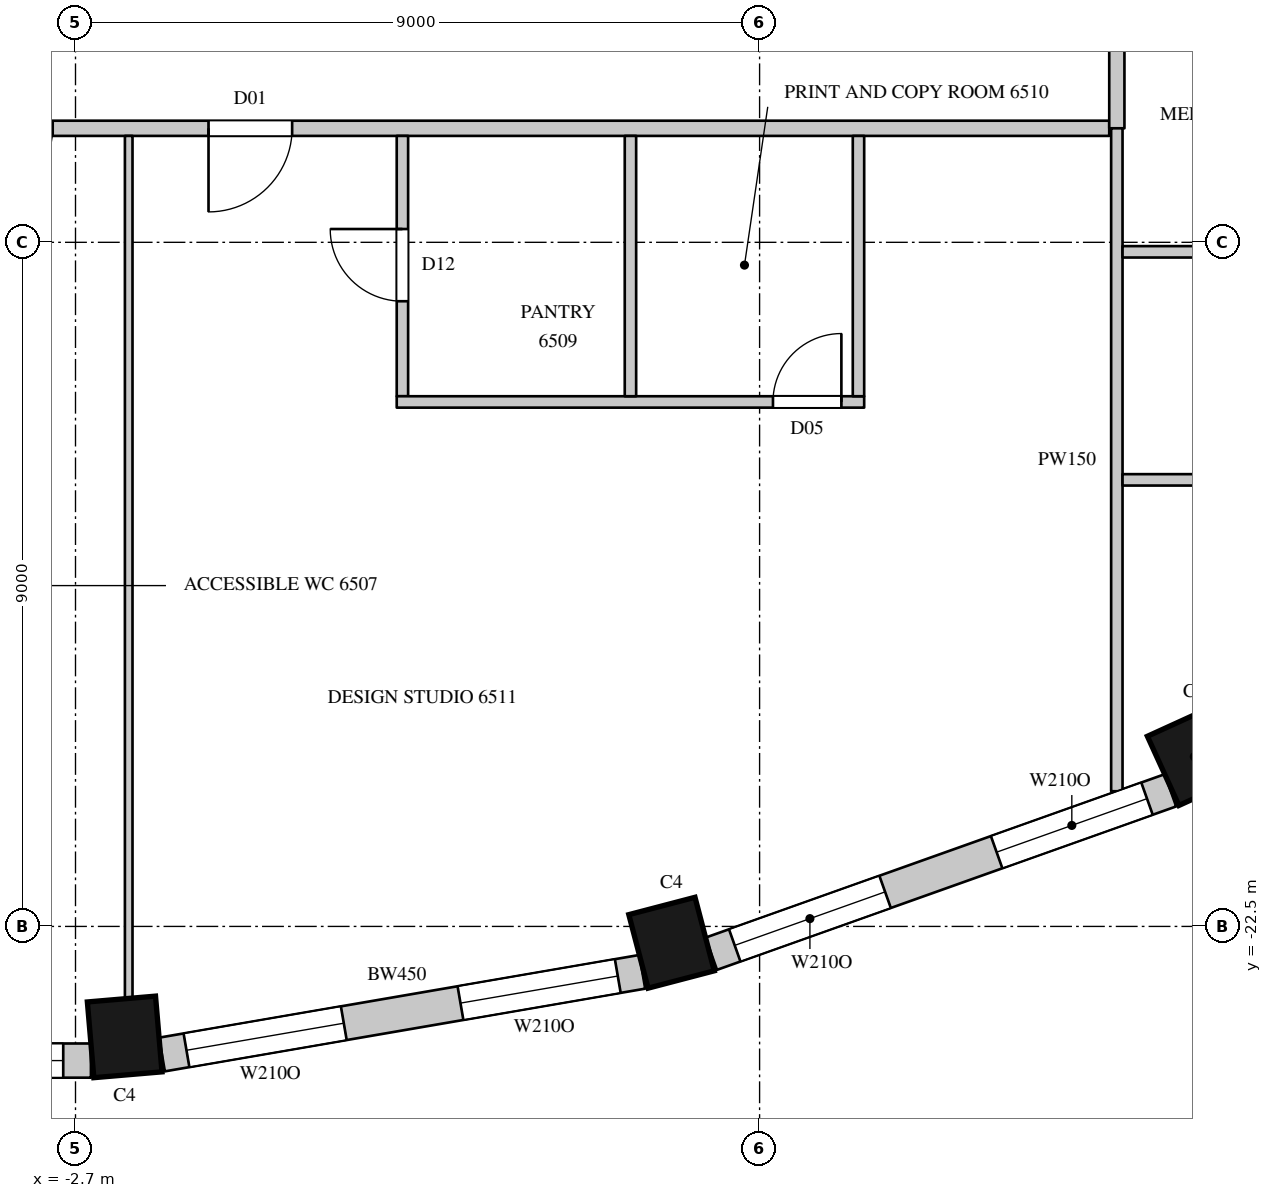
"""IFC4 building model, lengths in metres.
Left out: names, types, materials, properties, quantities, classifications, styles, units other than length and angle.
Written with IfcOpenShell. Run it as: python <this file> out.ifc"""

import sys

from ifc_helpers import new_model, si_unit, direction, frame, frame_2d, origin, origin_2d, place, context, subcontext, project, spatial, rectangle, extrude, element, fill, save


model = new_model("IFC4")
c1 = context("Model", 3, precision=1e-05, world=origin(), true_north=direction((0.0, 1.0)))
c2 = subcontext(c1, "Body", "Model", "MODEL_VIEW")
j1 = project(units=[si_unit("LENGTHUNIT", "METRE"), si_unit("PLANEANGLEUNIT", "RADIAN")], contexts=[c1])
p1 = place(None, origin())
s1 = spatial("IfcSite", under=j1, at=p1, CompositionType="ELEMENT")
p2 = place(p1, origin())
s2 = spatial("IfcBuilding", under=s1, at=p2, CompositionType="ELEMENT")
p3 = place(p2, frame((0.0, 0.0, 288.5)))
s3 = spatial("IfcBuildingStorey", under=s2, at=p3, CompositionType="ELEMENT", Elevation=288.5)
for number, where, z_axis, x_axis in (
    (1, (-2.053, -23.954, 0.0), (0.0, 0.0, 1.0), (0.996, 0.085, 0.0)),
    (2, (5.142, -22.715, 0.0), (0.0, 0.0, 1.0), (0.967, 0.253, 0.0)),
    (3, (12.019, -20.267, 0.0), (0.0, 0.0, 1.0), (0.91, 0.415, 0.0)),
):
    element("IfcColumn", number, at=place(p3, frame(where, z_axis=z_axis, x_axis=x_axis)), inside=s3, PredefinedType="COLUMN", context=c2, shape_type="SweptSolid", body=[
        extrude(rectangle(XDim=0.9, YDim=1.0, at=origin_2d()), origin(), (0.0, 0.0, 1.0), 4.1),
    ])
p4 = place(p3, frame((-8.903, -24.265, 0.0), z_axis=(0.0, 0.0, 1.0), x_axis=(1.0, 0.0, 0.0)))
e4 = element("IfcWall", 4, at=p4, inside=s3, PredefinedType="SOLIDWALL", context=c2, shape_type="SweptSolid", body=[
    extrude(rectangle(XDim=6.406, YDim=0.45, at=frame_2d((3.203, 0.0))), origin(), (0.0, 0.0, 1.0), 3.8),
])
p5 = place(p4, frame((1.514, 0.0, 1.05)))
e5 = element("IfcOpeningElement", 5, at=p5, cuts=e4, PredefinedType="OPENING", context=c2, shape_type="SweptSolid", body=[
    extrude(rectangle(XDim=0.9, YDim=2.4, at=frame_2d((0.45, 1.2))), frame((0.0, 0.235, 0.0), z_axis=(0.0, -1.0, 0.0), x_axis=(1.0, 0.0, 0.0)), (0.0, 0.0, 1.0), 0.47),
])
p6 = place(p4, frame((4.841, 0.0, 1.05)))
e6 = element("IfcOpeningElement", 6, at=p6, cuts=e4, PredefinedType="OPENING", context=c2, shape_type="SweptSolid", body=[
    extrude(rectangle(XDim=1.2, YDim=2.4, at=frame_2d((0.6, 1.2))), frame((0.0, 0.235, 0.0), z_axis=(0.0, -1.0, 0.0), x_axis=(1.0, 0.0, 0.0)), (0.0, 0.0, 1.0), 0.47),
])
p7 = place(p3, frame((-1.562, -24.185, 0.0), z_axis=(0.0, 0.0, 1.0), x_axis=(0.985502073964, 0.169663379113, 0.0)))
e7 = element("IfcWall", 7, at=p7, inside=s3, PredefinedType="SOLIDWALL", context=c2, shape_type="SweptSolid", body=[
    extrude(rectangle(XDim=6.412, YDim=0.45, at=frame_2d((3.206, 0.0))), origin(), (0.0, 0.0, 1.0), 3.8),
])
p8 = place(p7, frame((0.327, 0.0, 1.05)))
e8 = element("IfcOpeningElement", 8, at=p8, cuts=e7, PredefinedType="OPENING", context=c2, shape_type="SweptSolid", body=[
    extrude(rectangle(XDim=2.1, YDim=2.4, at=frame_2d((1.05, 1.2))), frame((0.0, 0.235, 0.0), z_axis=(0.0, -1.0, 0.0), x_axis=(1.0, 0.0, 0.0)), (0.0, 0.0, 1.0), 0.47),
])
p9 = place(p7, frame((3.985, 0.0, 1.05)))
e9 = element("IfcOpeningElement", 9, at=p9, cuts=e7, PredefinedType="OPENING", context=c2, shape_type="SweptSolid", body=[
    extrude(rectangle(XDim=2.1, YDim=2.4, at=frame_2d((1.05, 1.2))), frame((0.0, 0.235, 0.0), z_axis=(0.0, -1.0, 0.0), x_axis=(1.0, 0.0, 0.0)), (0.0, 0.0, 1.0), 0.47),
])
p10 = place(p3, frame((5.665, -22.859, 0.0), z_axis=(0.0, 0.0, 1.0), x_axis=(0.942108340262, 0.335308626803, 0.0)))
e10 = element("IfcWall", 10, at=p10, inside=s3, PredefinedType="SOLIDWALL", context=c2, shape_type="SweptSolid", body=[
    extrude(rectangle(XDim=6.412, YDim=0.45, at=frame_2d((3.206, 0.0))), origin(), (0.0, 0.0, 1.0), 3.8),
])
p11 = place(p10, frame((0.327, 0.0, 1.05)))
e11 = element("IfcOpeningElement", 11, at=p11, cuts=e10, PredefinedType="OPENING", context=c2, shape_type="SweptSolid", body=[
    extrude(rectangle(XDim=2.1, YDim=2.4, at=frame_2d((1.05, 1.2))), frame((0.0, 0.235, 0.0), z_axis=(0.0, -1.0, 0.0), x_axis=(1.0, 0.0, 0.0)), (0.0, 0.0, 1.0), 0.47),
])
p12 = place(p10, frame((3.985, 0.0, 1.05)))
e12 = element("IfcOpeningElement", 12, at=p12, cuts=e10, PredefinedType="OPENING", context=c2, shape_type="SweptSolid", body=[
    extrude(rectangle(XDim=2.1, YDim=2.4, at=frame_2d((1.05, 1.2))), frame((0.0, 0.235, 0.0), z_axis=(0.0, -1.0, 0.0), x_axis=(1.0, 0.0, 0.0)), (0.0, 0.0, 1.0), 0.47),
])
p13 = place(p3, frame((-10.9, -12.0, 0.0), z_axis=(0.0, 0.0, 1.0), x_axis=(1.0, 0.0, 0.0)))
e13 = element("IfcWall", 13, at=p13, inside=s3, PredefinedType="PARTITIONING", context=c2, shape_type="SweptSolid", body=[
    extrude(rectangle(XDim=21.8, YDim=0.2, at=frame_2d((10.9, 0.0))), origin(), (0.0, 0.0, 1.0), 3.8),
])
p14 = place(p13, frame((1.1, 0.0, 0.0)))
e14 = element("IfcOpeningElement", 14, at=p14, cuts=e13, PredefinedType="OPENING", context=c2, shape_type="SweptSolid", body=[
    extrude(rectangle(XDim=0.9, YDim=2.2, at=frame_2d((0.45, 1.1))), frame((0.0, 0.11, 0.0), z_axis=(0.0, -1.0, 0.0), x_axis=(1.0, 0.0, 0.0)), (0.0, 0.0, 1.0), 0.22),
])
p15 = place(p13, frame((4.9, 0.0, 0.0)))
e15 = element("IfcOpeningElement", 15, at=p15, cuts=e13, PredefinedType="OPENING", context=c2, shape_type="SweptSolid", body=[
    extrude(rectangle(XDim=0.9, YDim=2.2, at=frame_2d((0.45, 1.1))), frame((0.0, 0.11, 0.0), z_axis=(0.0, -1.0, 0.0), x_axis=(1.0, 0.0, 0.0)), (0.0, 0.0, 1.0), 0.22),
])
p16 = place(p13, frame((7.0, 0.0, 0.0)))
e16 = element("IfcOpeningElement", 16, at=p16, cuts=e13, PredefinedType="OPENING", context=c2, shape_type="SweptSolid", body=[
    extrude(rectangle(XDim=0.9, YDim=2.2, at=frame_2d((0.45, 1.1))), frame((0.0, 0.11, 0.0), z_axis=(0.0, -1.0, 0.0), x_axis=(1.0, 0.0, 0.0)), (0.0, 0.0, 1.0), 0.22),
])
p17 = place(p13, frame((9.95, 0.0, 0.0)))
e17 = element("IfcOpeningElement", 17, at=p17, cuts=e13, PredefinedType="OPENING", context=c2, shape_type="SweptSolid", body=[
    extrude(rectangle(XDim=1.1, YDim=2.4, at=frame_2d((0.55, 1.2))), frame((0.0, 0.11, 0.0), z_axis=(0.0, -1.0, 0.0), x_axis=(1.0, 0.0, 0.0)), (0.0, 0.0, 1.0), 0.22),
])
p18 = place(p3, frame((11.0, -12.0, 0.0), z_axis=(0.0, 0.0, 1.0), x_axis=(0.0, 1.0, 0.0)))
e18 = element("IfcWall", 18, at=p18, inside=s3, PredefinedType="PARTITIONING", context=c2, shape_type="SweptSolid", body=[
    extrude(rectangle(XDim=24.1, YDim=0.2, at=frame_2d((12.05, 0.0))), origin(), (0.0, 0.0, 1.0), 3.8),
])
p19 = place(p18, frame((9.85, 0.0, 0.0)))
e19 = element("IfcOpeningElement", 19, at=p19, cuts=e18, PredefinedType="OPENING", context=c2, shape_type="SweptSolid", body=[
    extrude(rectangle(XDim=1.5, YDim=2.4, at=frame_2d((0.75, 1.2))), frame((0.0, 0.11, 0.0), z_axis=(0.0, -1.0, 0.0), x_axis=(1.0, 0.0, 0.0)), (0.0, 0.0, 1.0), 0.22),
])
p20 = place(p18, frame((4.55, 0.0, 0.0)))
e20 = element("IfcOpeningElement", 20, at=p20, cuts=e18, PredefinedType="OPENING", context=c2, shape_type="SweptSolid", body=[
    extrude(rectangle(XDim=1.1, YDim=2.4, at=frame_2d((0.55, 1.2))), frame((0.0, 0.11, 0.0), z_axis=(0.0, -1.0, 0.0), x_axis=(1.0, 0.0, 0.0)), (0.0, 0.0, 1.0), 0.22),
])
p21 = place(p3, frame((1.601, -15.525, 0.0), z_axis=(0.0, 0.0, 1.0), x_axis=(0.0, 1.0, 0.0)))
e21 = element("IfcWall", 21, at=p21, inside=s3, PredefinedType="PARTITIONING", context=c2, shape_type="SweptSolid", body=[
    extrude(rectangle(XDim=3.425, YDim=0.15, at=frame_2d((1.712, 0.0))), origin(), (0.0, 0.0, 1.0), 3.8),
])
p22 = place(p21, frame((1.25, 0.0, 0.0)))
e22 = element("IfcOpeningElement", 22, at=p22, cuts=e21, PredefinedType="OPENING", context=c2, shape_type="SweptSolid", body=[
    extrude(rectangle(XDim=0.95, YDim=2.2, at=frame_2d((0.475, 1.1))), frame((0.0, 0.085, 0.0), z_axis=(0.0, -1.0, 0.0), x_axis=(1.0, 0.0, 0.0)), (0.0, 0.0, 1.0), 0.17),
])
p23 = place(p3, frame((1.526, -15.6, 0.0), z_axis=(0.0, 0.0, 1.0), x_axis=(1.0, 0.0, 0.0)))
e23 = element("IfcWall", 23, at=p23, inside=s3, PredefinedType="PARTITIONING", context=c2, shape_type="SweptSolid", body=[
    extrude(rectangle(XDim=6.15, YDim=0.15, at=frame_2d((3.075, 0.0))), origin(), (0.0, 0.0, 1.0), 3.8),
])
p24 = place(p23, frame((4.95, 0.0, 0.0)))
e24 = element("IfcOpeningElement", 24, at=p24, cuts=e23, PredefinedType="OPENING", context=c2, shape_type="SweptSolid", body=[
    extrude(rectangle(XDim=0.9, YDim=2.2, at=frame_2d((0.45, 1.1))), frame((0.0, 0.085, 0.0), z_axis=(0.0, -1.0, 0.0), x_axis=(1.0, 0.0, 0.0)), (0.0, 0.0, 1.0), 0.17),
])
for number, where, z_axis, x_axis in (
    (25, (4.601, -15.525, 0.0), (0.0, 0.0, 1.0), (0.0, 1.0, 0.0)),
    (26, (7.601, -15.525, 0.0), (0.0, 0.0, 1.0), (0.0, 1.0, 0.0)),
):
    element("IfcWall", number, at=place(p3, frame(where, z_axis=z_axis, x_axis=x_axis)), inside=s3, PredefinedType="PARTITIONING", context=c2, shape_type="SweptSolid", body=[
        extrude(rectangle(XDim=3.425, YDim=0.15, at=frame_2d((1.712, 0.0))), origin(), (0.0, 0.0, 1.0), 3.8),
    ])
p25 = place(p3, frame((11.0, -20.721, 0.0), z_axis=(0.0, 0.0, 1.0), x_axis=(0.0, 1.0, 0.0)))
e27 = element("IfcWall", 27, at=p25, inside=s3, PredefinedType="PARTITIONING", context=c2, shape_type="SweptSolid", body=[
    extrude(rectangle(XDim=8.721, YDim=0.15, at=frame_2d((4.361, 0.0))), origin(), (0.0, 0.0, 1.0), 3.8),
])
p26 = place(p3, frame((11.075, -16.625, 0.0), z_axis=(0.0, 0.0, 1.0), x_axis=(1.0, 0.0, 0.0)))
e28 = element("IfcWall", 28, at=p26, inside=s3, PredefinedType="PARTITIONING", context=c2, shape_type="SweptSolid", body=[
    extrude(rectangle(XDim=3.9, YDim=0.15, at=frame_2d((1.95, 0.0))), origin(), (0.0, 0.0, 1.0), 3.8),
])
p27 = place(p26, frame((1.4, 0.0, 0.0)))
e29 = element("IfcOpeningElement", 29, at=p27, cuts=e28, PredefinedType="OPENING", context=c2, shape_type="SweptSolid", body=[
    extrude(rectangle(XDim=0.95, YDim=2.2, at=frame_2d((0.475, 1.1))), frame((0.0, 0.085, 0.0), z_axis=(0.0, -1.0, 0.0), x_axis=(1.0, 0.0, 0.0)), (0.0, 0.0, 1.0), 0.17),
])
p28 = place(p3, frame((11.075, -13.625, 0.0), z_axis=(0.0, 0.0, 1.0), x_axis=(1.0, 0.0, 0.0)))
e30 = element("IfcWall", 30, at=p28, inside=s3, PredefinedType="PARTITIONING", context=c2, shape_type="SweptSolid", body=[
    extrude(rectangle(XDim=3.75, YDim=0.15, at=frame_2d((1.875, 0.0))), origin(), (0.0, 0.0, 1.0), 3.8),
])
p29 = place(p3, frame((-2.0, -23.447, 0.0), z_axis=(0.0, 0.0, 1.0), x_axis=(0.0, 1.0, 0.0)))
e31 = element("IfcWall", 31, at=p29, inside=s3, PredefinedType="PARTITIONING", context=c2, shape_type="SweptSolid", body=[
    extrude(rectangle(XDim=11.347, YDim=0.1, at=frame_2d((5.674, 0.0))), origin(), (0.0, 0.0, 1.0), 3.8),
])
p30 = place(p8, origin())
e32 = element("IfcWindow", 32, at=p30, inside=s3, PartitioningType="SINGLE_PANEL", PredefinedType="WINDOW", context=c2, shape_type="SweptSolid", body=[
    extrude(rectangle(XDim=2.1, YDim=2.4, at=frame_2d((1.05, 1.2))), frame((0.0, 0.135, 0.0), z_axis=(0.0, -1.0, 0.0), x_axis=(1.0, 0.0, 0.0)), (0.0, 0.0, 1.0), 0.06),
])
fill(e8, e32)
p31 = place(p9, origin())
e33 = element("IfcWindow", 33, at=p31, inside=s3, PartitioningType="SINGLE_PANEL", PredefinedType="WINDOW", context=c2, shape_type="SweptSolid", body=[
    extrude(rectangle(XDim=2.1, YDim=2.4, at=frame_2d((1.05, 1.2))), frame((0.0, 0.135, 0.0), z_axis=(0.0, -1.0, 0.0), x_axis=(1.0, 0.0, 0.0)), (0.0, 0.0, 1.0), 0.06),
])
fill(e9, e33)
p32 = place(p11, origin())
e34 = element("IfcWindow", 34, at=p32, inside=s3, PartitioningType="SINGLE_PANEL", PredefinedType="WINDOW", context=c2, shape_type="SweptSolid", body=[
    extrude(rectangle(XDim=2.1, YDim=2.4, at=frame_2d((1.05, 1.2))), frame((0.0, 0.135, 0.0), z_axis=(0.0, -1.0, 0.0), x_axis=(1.0, 0.0, 0.0)), (0.0, 0.0, 1.0), 0.06),
])
fill(e11, e34)
p33 = place(p12, origin())
e35 = element("IfcWindow", 35, at=p33, inside=s3, PartitioningType="SINGLE_PANEL", PredefinedType="WINDOW", context=c2, shape_type="SweptSolid", body=[
    extrude(rectangle(XDim=2.1, YDim=2.4, at=frame_2d((1.05, 1.2))), frame((0.0, 0.135, 0.0), z_axis=(0.0, -1.0, 0.0), x_axis=(1.0, 0.0, 0.0)), (0.0, 0.0, 1.0), 0.06),
])
fill(e12, e35)
p34 = place(p17, origin())
e36 = element("IfcDoor", 36, at=p34, inside=s3, OperationType="SINGLE_SWING_RIGHT", PredefinedType="DOOR", context=c2, shape_type="SweptSolid", body=[
    extrude(rectangle(XDim=1.1, YDim=2.4, at=frame_2d((0.55, 1.2))), frame((0.0, 0.025, 0.0), z_axis=(0.0, -1.0, 0.0), x_axis=(1.0, 0.0, 0.0)), (0.0, 0.0, 1.0), 0.05),
])
fill(e17, e36)
p35 = place(p22, origin())
e37 = element("IfcDoor", 37, at=p35, inside=s3, OperationType="SINGLE_SWING_RIGHT", PredefinedType="DOOR", context=c2, shape_type="SweptSolid", body=[
    extrude(rectangle(XDim=0.95, YDim=2.2, at=frame_2d((0.475, 1.1))), frame((0.0, 0.025, 0.0), z_axis=(0.0, -1.0, 0.0), x_axis=(1.0, 0.0, 0.0)), (0.0, 0.0, 1.0), 0.05),
])
fill(e22, e37)
p36 = place(p24, origin())
e38 = element("IfcDoor", 38, at=p36, inside=s3, OperationType="SINGLE_SWING_RIGHT", PredefinedType="DOOR", context=c2, shape_type="SweptSolid", body=[
    extrude(rectangle(XDim=0.9, YDim=2.2, at=frame_2d((0.45, 1.1))), frame((0.0, 0.025, 0.0), z_axis=(0.0, -1.0, 0.0), x_axis=(1.0, 0.0, 0.0)), (0.0, 0.0, 1.0), 0.05),
])
fill(e24, e38)
p37 = place(p6, origin())
e39 = element("IfcWindow", 39, at=p37, inside=s3, PartitioningType="SINGLE_PANEL", PredefinedType="WINDOW", context=c2, shape_type="SweptSolid", body=[
    extrude(rectangle(XDim=1.2, YDim=2.4, at=frame_2d((0.6, 1.2))), frame((0.0, 0.135, 0.0), z_axis=(0.0, -1.0, 0.0), x_axis=(1.0, 0.0, 0.0)), (0.0, 0.0, 1.0), 0.06),
])
fill(e6, e39)
save(model, sys.argv[1])
